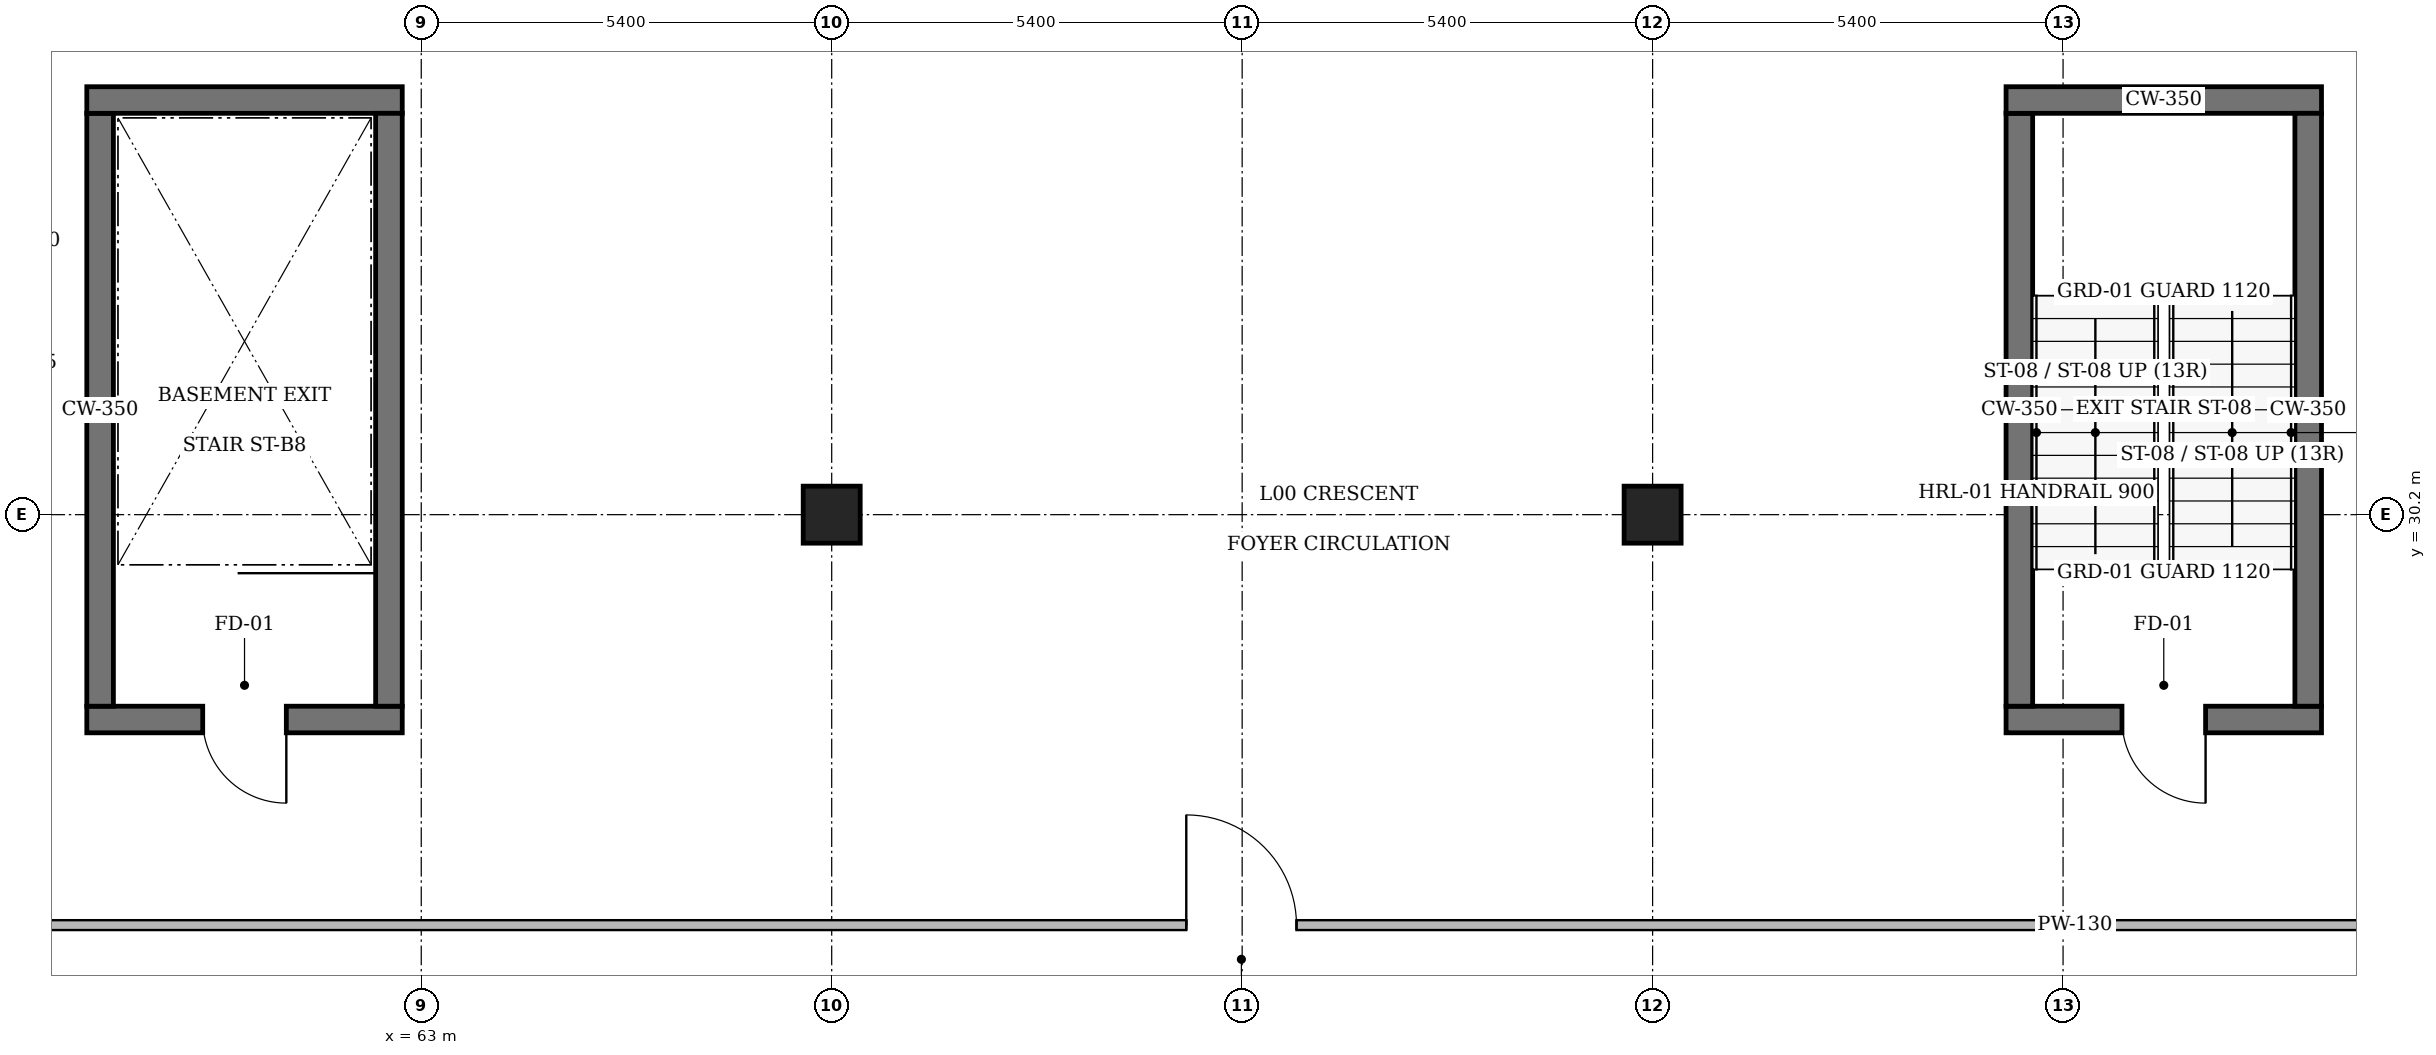
"""IFC4 building model, lengths in metres.
Left out: names, types, materials, properties, quantities, classifications, styles, units other than length and angle.
Written with IfcOpenShell. Run it as: python <this file> out.ifc"""

import sys

from ifc_helpers import new_model, si_unit, direction, frame, frame_2d, origin, origin_2d, place, context, subcontext, project, spatial, rectangle, circle, extrude, element, fill, save


model = new_model("IFC4")
c1 = context("Model", 3, precision=1e-05, world=origin(), true_north=direction((0.0, 1.0)))
c2 = subcontext(c1, "Body", "Model", "MODEL_VIEW")
j1 = project(units=[si_unit("LENGTHUNIT", "METRE"), si_unit("PLANEANGLEUNIT", "RADIAN")], contexts=[c1])
p1 = place(None, origin())
s1 = spatial("IfcSite", under=j1, at=p1, CompositionType="ELEMENT")
p2 = place(p1, origin())
s2 = spatial("IfcBuilding", under=s1, at=p2, CompositionType="ELEMENT")
p3 = place(p2, origin())
s3 = spatial("IfcBuildingStorey", under=s2, at=p3, CompositionType="ELEMENT", Elevation=0.0)
for number, where, z_axis, x_axis in (
    (1, (68.4, 30.2, 0.0), (0.0, 0.0, 1.0), (1.0, 0.0, 0.0)),
    (2, (79.2, 30.2, 0.0), (0.0, 0.0, 1.0), (1.0, 0.0, 0.0)),
):
    element("IfcColumn", number, at=place(p3, frame(where, z_axis=z_axis, x_axis=x_axis)), inside=s3, PredefinedType="COLUMN", context=c2, shape_type="SweptSolid", body=[
        extrude(circle(Radius=0.375, at=origin_2d()), origin(), (0.0, 0.0, 1.0), 4.8),
    ])
p4 = place(p3, frame((88.0, 27.505, 0.0), z_axis=(0.0, 0.0, 1.0), x_axis=(-1.0, 0.0, 0.0)))
e3 = element("IfcWall", 3, at=p4, inside=s3, PredefinedType="SOLIDWALL", context=c2, shape_type="SweptSolid", body=[
    extrude(rectangle(XDim=4.15, YDim=0.35, at=frame_2d((2.075, 0.0))), origin(), (0.0, 0.0, 1.0), 4.8),
])
p5 = place(p4, frame((1.525, 0.0, 0.0)))
e4 = element("IfcOpeningElement", 4, at=p5, cuts=e3, PredefinedType="OPENING", context=c2, shape_type="SweptSolid", body=[
    extrude(rectangle(XDim=1.1, YDim=2.15, at=frame_2d((0.55, 1.075))), frame((0.0, 0.195, 0.0), z_axis=(0.0, -1.0, 0.0), x_axis=(1.0, 0.0, 0.0)), (0.0, 0.0, 1.0), 0.39),
])
p6 = place(p3, frame((84.025, 27.68, 0.0), z_axis=(0.0, 0.0, 1.0), x_axis=(0.0, 1.0, 0.0)))
e5 = element("IfcWall", 5, at=p6, inside=s3, PredefinedType="SOLIDWALL", context=c2, shape_type="SweptSolid", body=[
    extrude(rectangle(XDim=7.8, YDim=0.35, at=frame_2d((3.9, 0.0))), origin(), (0.0, 0.0, 1.0), 4.8),
])
p7 = place(p3, frame((83.85, 35.655, 0.0), z_axis=(0.0, 0.0, 1.0), x_axis=(1.0, 0.0, 0.0)))
e6 = element("IfcWall", 6, at=p7, inside=s3, PredefinedType="SOLIDWALL", context=c2, shape_type="SweptSolid", body=[
    extrude(rectangle(XDim=4.15, YDim=0.35, at=frame_2d((2.075, 0.0))), origin(), (0.0, 0.0, 1.0), 4.8),
])
p8 = place(p3, frame((87.825, 35.48, 0.0), z_axis=(0.0, 0.0, 1.0), x_axis=(0.0, -1.0, 0.0)))
e7 = element("IfcWall", 7, at=p8, inside=s3, PredefinedType="SOLIDWALL", context=c2, shape_type="SweptSolid", body=[
    extrude(rectangle(XDim=7.8, YDim=0.35, at=frame_2d((3.9, 0.0))), origin(), (0.0, 0.0, 1.0), 4.8),
])
p9 = place(p3, frame((62.75, 27.505, 0.0), z_axis=(0.0, 0.0, 1.0), x_axis=(-1.0, 0.0, 0.0)))
e8 = element("IfcWall", 8, at=p9, inside=s3, PredefinedType="SOLIDWALL", context=c2, shape_type="SweptSolid", body=[
    extrude(rectangle(XDim=4.15, YDim=0.35, at=frame_2d((2.075, 0.0))), origin(), (0.0, 0.0, 1.0), 4.54),
])
p10 = place(p9, frame((1.525, 0.0, 0.0)))
e9 = element("IfcOpeningElement", 9, at=p10, cuts=e8, PredefinedType="OPENING", context=c2, shape_type="SweptSolid", body=[
    extrude(rectangle(XDim=1.1, YDim=2.15, at=frame_2d((0.55, 1.075))), frame((0.0, 0.195, 0.0), z_axis=(0.0, -1.0, 0.0), x_axis=(1.0, 0.0, 0.0)), (0.0, 0.0, 1.0), 0.39),
])
p11 = place(p3, frame((58.775, 27.68, 0.0), z_axis=(0.0, 0.0, 1.0), x_axis=(0.0, 1.0, 0.0)))
e10 = element("IfcWall", 10, at=p11, inside=s3, PredefinedType="SOLIDWALL", context=c2, shape_type="SweptSolid", body=[
    extrude(rectangle(XDim=7.8, YDim=0.35, at=frame_2d((3.9, 0.0))), origin(), (0.0, 0.0, 1.0), 4.54),
])
p12 = place(p3, frame((58.6, 35.655, 0.0), z_axis=(0.0, 0.0, 1.0), x_axis=(1.0, 0.0, 0.0)))
e11 = element("IfcWall", 11, at=p12, inside=s3, PredefinedType="SOLIDWALL", context=c2, shape_type="SweptSolid", body=[
    extrude(rectangle(XDim=4.15, YDim=0.35, at=frame_2d((2.075, 0.0))), origin(), (0.0, 0.0, 1.0), 4.54),
])
p13 = place(p3, frame((62.575, 35.48, 0.0), z_axis=(0.0, 0.0, 1.0), x_axis=(0.0, -1.0, 0.0)))
e12 = element("IfcWall", 12, at=p13, inside=s3, PredefinedType="SOLIDWALL", context=c2, shape_type="SweptSolid", body=[
    extrude(rectangle(XDim=7.8, YDim=0.35, at=frame_2d((3.9, 0.0))), origin(), (0.0, 0.0, 1.0), 4.54),
])
p14 = place(p3, frame((57.8, 24.8, 0.0), z_axis=(0.0, 0.0, 1.0), x_axis=(1.0, 0.0, 0.0)))
e13 = element("IfcWall", 13, at=p14, inside=s3, PredefinedType="PARTITIONING", context=c2, shape_type="SweptSolid", body=[
    extrude(rectangle(XDim=37.2, YDim=0.13, at=frame_2d((18.6, 0.0))), origin(), (0.0, 0.0, 1.0), 4.54),
])
p15 = place(p14, frame((15.265, 0.0, 0.0)))
e14 = element("IfcOpeningElement", 14, at=p15, cuts=e13, PredefinedType="OPENING", context=c2, shape_type="SweptSolid", body=[
    extrude(rectangle(XDim=1.45, YDim=2.2, at=frame_2d((0.725, 1.1))), frame((0.0, 0.085, 0.0), z_axis=(0.0, -1.0, 0.0), x_axis=(1.0, 0.0, 0.0)), (0.0, 0.0, 1.0), 0.17),
])
p16 = place(p5, origin())
e15 = element("IfcDoor", 15, at=p16, inside=s3, OperationType="SINGLE_SWING_LEFT", PredefinedType="DOOR", context=c2, shape_type="SweptSolid", body=[
    extrude(rectangle(XDim=1.1, YDim=2.15, at=frame_2d((0.55, 1.075))), frame((0.0, 0.025, 0.0), z_axis=(0.0, -1.0, 0.0), x_axis=(1.0, 0.0, 0.0)), (0.0, 0.0, 1.0), 0.05),
])
fill(e4, e15)
p17 = place(p10, origin())
e16 = element("IfcDoor", 16, at=p17, inside=s3, OperationType="SINGLE_SWING_LEFT", PredefinedType="DOOR", context=c2, shape_type="SweptSolid", body=[
    extrude(rectangle(XDim=1.1, YDim=2.15, at=frame_2d((0.55, 1.075))), frame((0.0, 0.025, 0.0), z_axis=(0.0, -1.0, 0.0), x_axis=(1.0, 0.0, 0.0)), (0.0, 0.0, 1.0), 0.05),
])
fill(e9, e16)
p18 = place(p15, origin())
e17 = element("IfcDoor", 17, at=p18, inside=s3, OperationType="DOUBLE_DOOR_SINGLE_SWING", PredefinedType="DOOR", context=c2, shape_type="SweptSolid", body=[
    extrude(rectangle(XDim=1.45, YDim=2.2, at=frame_2d((0.725, 1.1))), frame((0.0, 0.025, 0.0), z_axis=(0.0, -1.0, 0.0), x_axis=(1.0, 0.0, 0.0)), (0.0, 0.0, 1.0), 0.05),
])
fill(e14, e17)
save(model, sys.argv[1])
